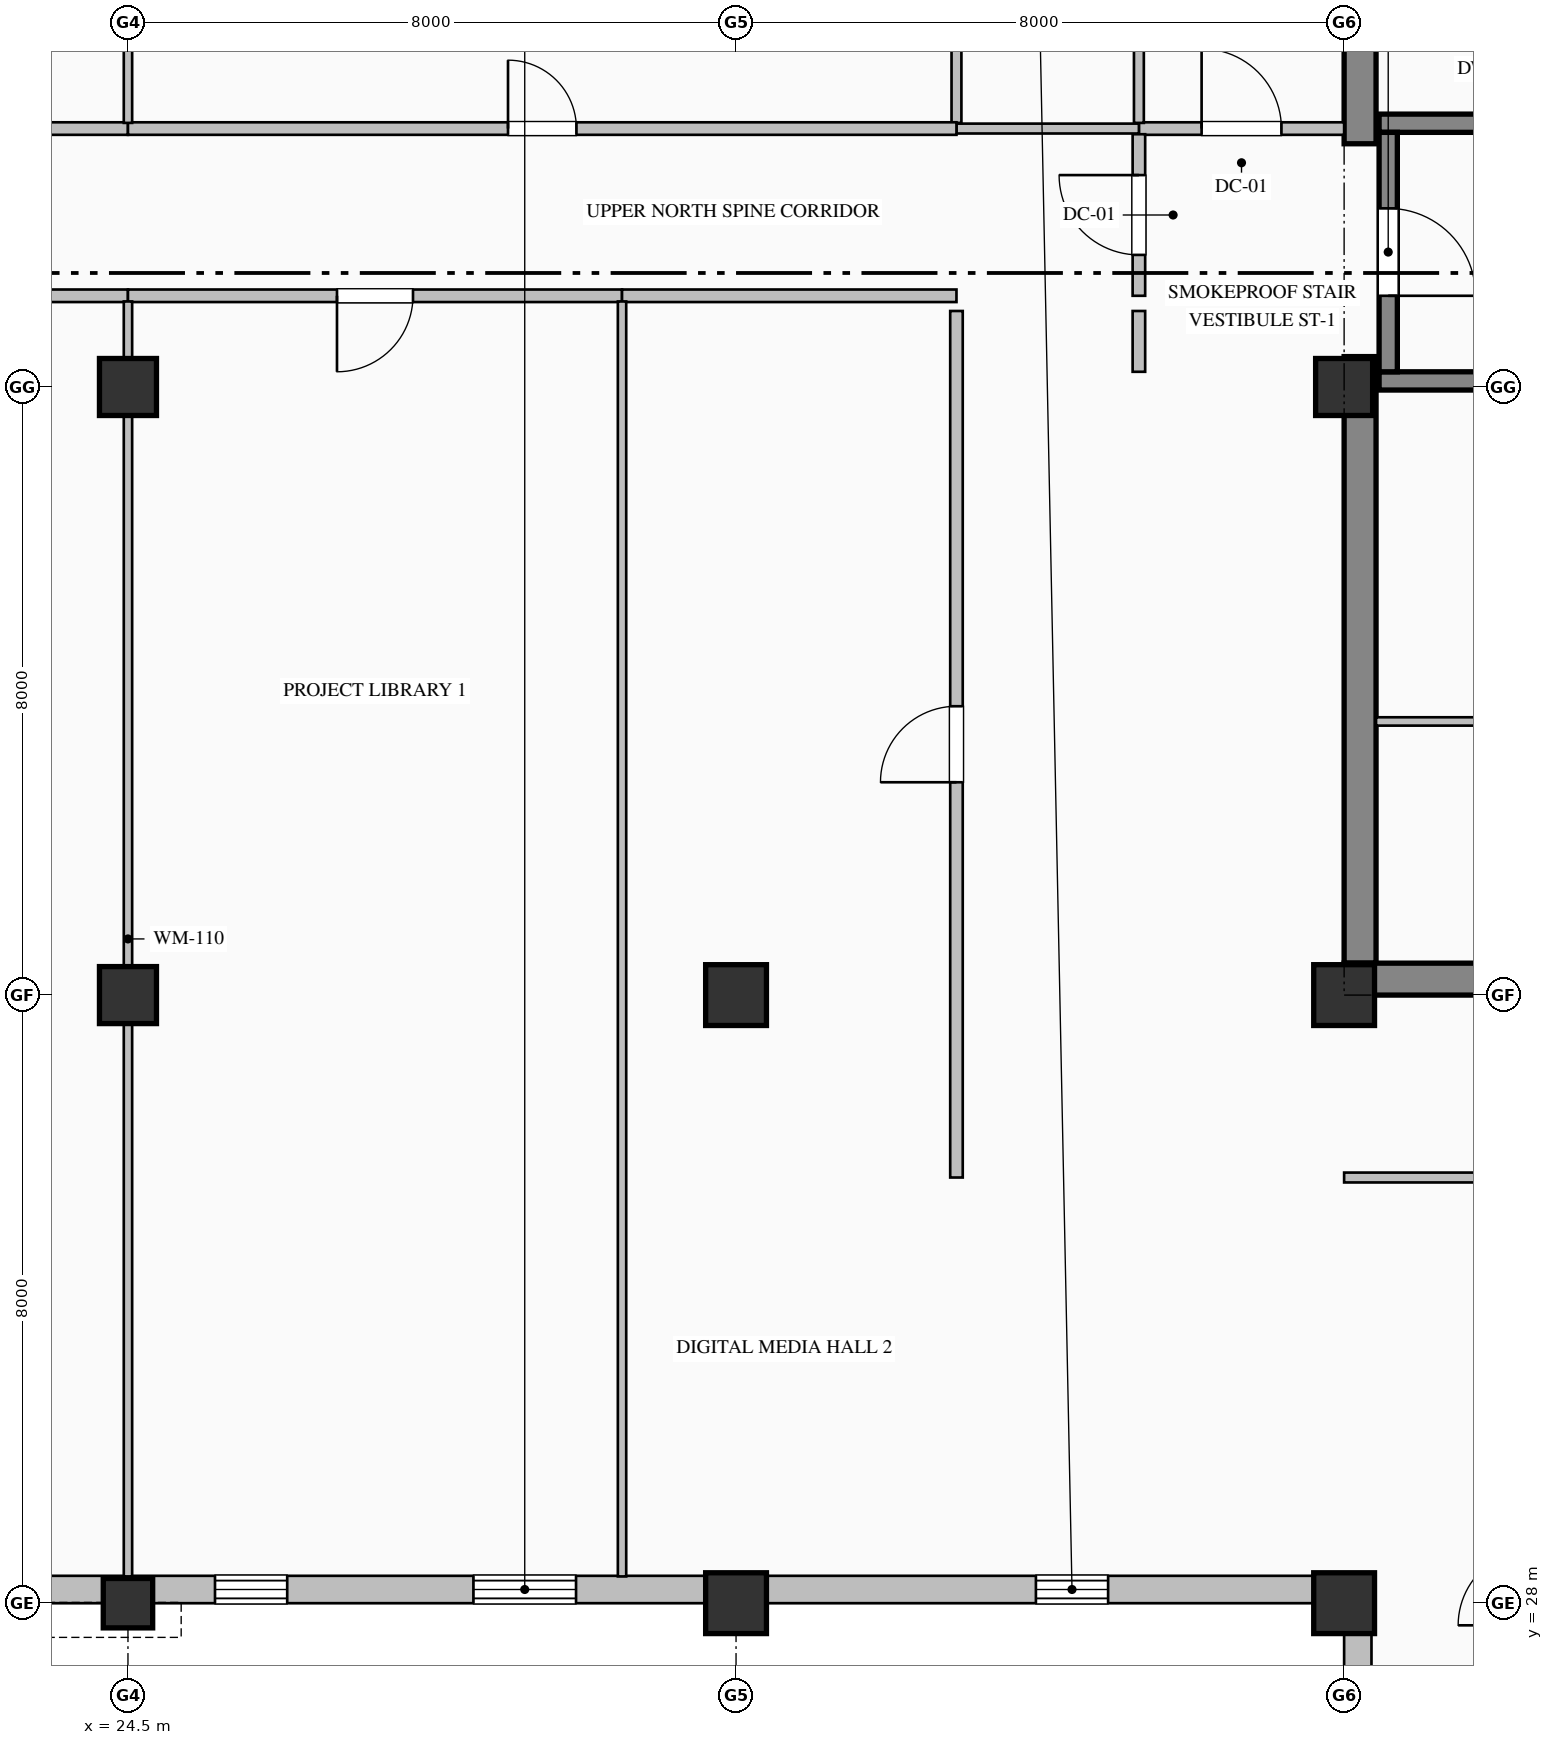
"""IFC4 building model, lengths in metres.
Left out: names, types, materials, properties, quantities, classifications, styles, units other than length and angle.
Written with IfcOpenShell. Run it as: python <this file> out.ifc"""

import sys

from ifc_helpers import new_model, si_unit, direction, frame, frame_2d, origin, origin_2d, place, context, subcontext, project, spatial, rectangle, hollow_rectangle, extrude, element, fill, save


model = new_model("IFC4")
c1 = context("Model", 3, precision=1e-05, world=origin(), true_north=direction((0.0, 1.0)))
c2 = subcontext(c1, "Body", "Model", "MODEL_VIEW")
j1 = project(units=[si_unit("LENGTHUNIT", "METRE"), si_unit("PLANEANGLEUNIT", "RADIAN")], contexts=[c1])
p1 = place(None, origin())
s1 = spatial("IfcSite", under=j1, at=p1, CompositionType="ELEMENT")
p2 = place(p1, origin())
s2 = spatial("IfcBuilding", under=s1, at=p2, CompositionType="ELEMENT")
p3 = place(p2, frame((0.0, 0.0, 319.2)))
s3 = spatial("IfcBuildingStorey", under=s2, at=p3, CompositionType="ELEMENT", Elevation=319.2)
p4 = place(p3, frame((40.71, 36.42, 0.0), z_axis=(0.0, 0.0, 1.0), x_axis=(0.0, 1.0, 0.0)))
e1 = element("IfcWall", 1, at=p4, inside=s3, PredefinedType="SHEAR", context=c2, shape_type="SweptSolid", body=[
    extrude(rectangle(XDim=7.98, YDim=0.42, at=frame_2d((3.99, 0.0))), origin(), (0.0, 0.0, 1.0), 3.785),
])
p5 = place(p3, frame((40.71, 47.2, 0.0), z_axis=(0.0, 0.0, 1.0), x_axis=(0.0, 1.0, 0.0)))
e2 = element("IfcWall", 2, at=p5, inside=s3, PredefinedType="SHEAR", context=c2, shape_type="SweptSolid", body=[
    extrude(rectangle(XDim=4.38, YDim=0.42, at=frame_2d((2.19, 0.0))), origin(), (0.0, 0.0, 1.0), 3.785),
])
p6 = place(p3, frame((40.5, 36.21, 0.0), z_axis=(0.0, 0.0, 1.0), x_axis=(1.0, 0.0, 0.0)))
e3 = element("IfcWall", 3, at=p6, inside=s3, PredefinedType="SHEAR", context=c2, shape_type="SweptSolid", body=[
    extrude(rectangle(XDim=9.1, YDim=0.42, at=frame_2d((4.55, 0.0))), origin(), (0.0, 0.0, 1.0), 3.785),
])
p7 = place(p3, frame((24.5, 28.0, 0.0), z_axis=(0.0, 0.0, 1.0), x_axis=(1.0, 0.0, 0.0)))
e4 = element("IfcColumn", 4, at=p7, inside=s3, PredefinedType="COLUMN", context=c2, shape_type="SweptSolid", body=[
    extrude(hollow_rectangle(XDim=0.65, YDim=0.65, WallThickness=0.028, at=origin_2d()), origin(), (0.0, 0.0, 1.0), 4.0),
])
for number, where, z_axis, x_axis in (
    (5, (24.5, 36.0, 0.0), (0.0, 0.0, 1.0), (1.0, 0.0, 0.0)),
    (6, (24.5, 44.0, 0.0), (0.0, 0.0, 1.0), (1.0, 0.0, 0.0)),
):
    element("IfcColumn", number, at=place(p3, frame(where, z_axis=z_axis, x_axis=x_axis)), inside=s3, PredefinedType="COLUMN", context=c2, shape_type="SweptSolid", body=[
        extrude(rectangle(XDim=0.75, YDim=0.75, at=origin_2d()), origin(), (0.0, 0.0, 1.0), 4.0),
    ])
for number, where, z_axis, x_axis in (
    (7, (32.5, 28.0, 0.0), (0.0, 0.0, 1.0), (1.0, 0.0, 0.0)),
    (8, (32.5, 36.0, 0.0), (0.0, 0.0, 1.0), (1.0, 0.0, 0.0)),
    (9, (40.5, 28.0, 0.0), (0.0, 0.0, 1.0), (1.0, 0.0, 0.0)),
    (10, (40.5, 36.0, 0.0), (0.0, 0.0, 1.0), (1.0, 0.0, 0.0)),
):
    element("IfcColumn", number, at=place(p3, frame(where, z_axis=z_axis, x_axis=x_axis)), inside=s3, PredefinedType="COLUMN", context=c2, shape_type="SweptSolid", body=[
        extrude(hollow_rectangle(XDim=0.8, YDim=0.8, WallThickness=0.032, at=origin_2d()), origin(), (0.0, 0.0, 1.0), 4.0),
    ])
p8 = place(p3, frame((40.5, 44.0, 0.0), z_axis=(0.0, 0.0, 1.0), x_axis=(1.0, 0.0, 0.0)))
e11 = element("IfcColumn", 11, at=p8, inside=s3, PredefinedType="COLUMN", context=c2, shape_type="SweptSolid", body=[
    extrude(rectangle(XDim=0.75, YDim=0.75, at=origin_2d()), origin(), (0.0, 0.0, 1.0), 4.0),
])
p9 = place(p3, frame((40.68, 22.5, 0.0), z_axis=(0.0, 0.0, 1.0), x_axis=(0.0, 1.0, 0.0)))
e12 = element("IfcWall", 12, at=p9, inside=s3, PredefinedType="SOLIDWALL", context=c2, shape_type="SweptSolid", body=[
    extrude(rectangle(XDim=5.86, YDim=0.36, at=frame_2d((2.93, 0.0))), origin(), (0.0, 0.0, 1.0), 3.185),
])
p10 = place(p3, frame((40.52, 28.18, 0.0), z_axis=(0.0, 0.0, 1.0), x_axis=(-1.0, 0.0, 0.0)))
e13 = element("IfcWall", 13, at=p10, inside=s3, PredefinedType="SOLIDWALL", context=c2, shape_type="SweptSolid", body=[
    extrude(rectangle(XDim=20.02, YDim=0.36, at=frame_2d((10.01, 0.0))), origin(), (0.0, 0.0, 1.0), 3.185),
])
p11 = place(p10, frame((3.125, 0.0, 0.9)))
e14 = element("IfcOpeningElement", 14, at=p11, cuts=e13, PredefinedType="OPENING", context=c2, shape_type="SweptSolid", body=[
    extrude(rectangle(XDim=0.95, YDim=1.85, at=frame_2d((0.475, 0.925))), frame((0.0, 0.19, 0.0), z_axis=(0.0, -1.0, 0.0), x_axis=(1.0, 0.0, 0.0)), (0.0, 0.0, 1.0), 0.38),
])
p12 = place(p10, frame((10.125, 0.0, 0.9)))
e15 = element("IfcOpeningElement", 15, at=p12, cuts=e13, PredefinedType="OPENING", context=c2, shape_type="SweptSolid", body=[
    extrude(rectangle(XDim=1.35, YDim=1.85, at=frame_2d((0.675, 0.925))), frame((0.0, 0.19, 0.0), z_axis=(0.0, -1.0, 0.0), x_axis=(1.0, 0.0, 0.0)), (0.0, 0.0, 1.0), 0.38),
])
p13 = place(p10, frame((13.925, 0.0, 0.9)))
e16 = element("IfcOpeningElement", 16, at=p13, cuts=e13, PredefinedType="OPENING", context=c2, shape_type="SweptSolid", body=[
    extrude(rectangle(XDim=0.95, YDim=1.85, at=frame_2d((0.475, 0.925))), frame((0.0, 0.19, 0.0), z_axis=(0.0, -1.0, 0.0), x_axis=(1.0, 0.0, 0.0)), (0.0, 0.0, 1.0), 0.38),
])
for number, where, z_axis, x_axis in (
    (17, (40.96, 47.47, 0.0), (0.0, 0.0, 1.0), (1.0, 0.0, 0.0)),
    (18, (49.04, 44.08, 0.0), (0.0, 0.0, 1.0), (-1.0, 0.0, 0.0)),
):
    element("IfcWall", number, at=place(p3, frame(where, z_axis=z_axis, x_axis=x_axis)), inside=s3, PredefinedType="SOLIDWALL", context=c2, shape_type="SweptSolid", body=[
        extrude(rectangle(XDim=8.08, YDim=0.24, at=frame_2d((4.04, 0.0))), origin(), (0.0, 0.0, 1.0), 4.0),
    ])
p14 = place(p3, frame((41.08, 47.35, 0.0), z_axis=(0.0, 0.0, 1.0), x_axis=(0.0, -1.0, 0.0)))
e19 = element("IfcWall", 19, at=p14, inside=s3, PredefinedType="SOLIDWALL", context=c2, shape_type="SweptSolid", body=[
    extrude(rectangle(XDim=3.15, YDim=0.24, at=frame_2d((1.575, 0.0))), origin(), (0.0, 0.0, 1.0), 4.0),
])
p15 = place(p14, frame((1.0, 0.0, 0.0)))
e20 = element("IfcOpeningElement", 20, at=p15, cuts=e19, PredefinedType="OPENING", context=c2, shape_type="SweptSolid", body=[
    extrude(rectangle(XDim=1.15, YDim=2.2, at=frame_2d((0.575, 1.1))), frame((0.0, 0.13, 0.0), z_axis=(0.0, -1.0, 0.0), x_axis=(1.0, 0.0, 0.0)), (0.0, 0.0, 1.0), 0.26),
])
p16 = place(p3, frame((37.8, 47.4, 0.0), z_axis=(0.0, 0.0, 1.0), x_axis=(1.0, 0.0, 0.0)))
e21 = element("IfcWall", 21, at=p16, inside=s3, PredefinedType="PARTITIONING", context=c2, shape_type="SweptSolid", body=[
    extrude(rectangle(XDim=2.7, YDim=0.165, at=frame_2d((1.35, 0.0))), origin(), (0.0, 0.0, 1.0), 3.785),
])
p17 = place(p16, frame((0.825, 0.0, 0.0)))
e22 = element("IfcOpeningElement", 22, at=p17, cuts=e21, PredefinedType="OPENING", context=c2, shape_type="SweptSolid", body=[
    extrude(rectangle(XDim=1.05, YDim=2.15, at=frame_2d((0.525, 1.075))), frame((0.0, 0.093, 0.0), z_axis=(0.0, -1.0, 0.0), x_axis=(1.0, 0.0, 0.0)), (0.0, 0.0, 1.0), 0.185),
])
p18 = place(p3, frame((37.8, 45.2, 0.0), z_axis=(0.0, 0.0, 1.0), x_axis=(0.0, 1.0, 0.0)))
e23 = element("IfcWall", 23, at=p18, inside=s3, PredefinedType="PARTITIONING", context=c2, shape_type="SweptSolid", body=[
    extrude(rectangle(XDim=2.125, YDim=0.165, at=frame_2d((1.063, 0.0))), origin(), (0.0, 0.0, 1.0), 3.785),
])
p19 = place(p18, frame((0.538, 0.0, 0.0)))
e24 = element("IfcOpeningElement", 24, at=p19, cuts=e23, PredefinedType="OPENING", context=c2, shape_type="SweptSolid", body=[
    extrude(rectangle(XDim=1.05, YDim=2.15, at=frame_2d((0.525, 1.075))), frame((0.0, 0.093, 0.0), z_axis=(0.0, -1.0, 0.0), x_axis=(1.0, 0.0, 0.0)), (0.0, 0.0, 1.0), 0.185),
])
p20 = place(p3, frame((37.8, 44.2, 0.0), z_axis=(0.0, 0.0, 1.0), x_axis=(0.0, 1.0, 0.0)))
e25 = element("IfcWall", 25, at=p20, inside=s3, PredefinedType="PARTITIONING", context=c2, shape_type="SweptSolid", body=[
    extrude(rectangle(XDim=0.8, YDim=0.165, at=frame_2d((0.4, 0.0))), origin(), (0.0, 0.0, 1.0), 3.785),
])
p21 = place(p3, frame((37.8, 47.475, 0.0), z_axis=(0.0, 0.0, 1.0), x_axis=(0.0, 1.0, 0.0)))
e26 = element("IfcWall", 26, at=p21, inside=s3, PredefinedType="PARTITIONING", context=c2, shape_type="SweptSolid", body=[
    extrude(rectangle(XDim=4.173, YDim=0.13, at=frame_2d((2.087, 0.0))), origin(), (0.0, 0.0, 1.0), 3.785),
])
p22 = place(p21, frame((1.577, 0.0, 0.0)))
e27 = element("IfcOpeningElement", 27, at=p22, cuts=e26, PredefinedType="OPENING", context=c2, shape_type="SweptSolid", body=[
    extrude(rectangle(XDim=1.02, YDim=2.15, at=frame_2d((0.51, 1.075))), frame((0.0, 0.075, 0.0), z_axis=(0.0, -1.0, 0.0), x_axis=(1.0, 0.0, 0.0)), (0.0, 0.0, 1.0), 0.15),
])
p23 = place(p3, frame((37.8, 47.4, 0.0), z_axis=(0.0, 0.0, 1.0), x_axis=(-1.0, 0.0, 0.0)))
e28 = element("IfcWall", 28, at=p23, inside=s3, PredefinedType="PARTITIONING", context=c2, shape_type="SweptSolid", body=[
    extrude(rectangle(XDim=2.4, YDim=0.13, at=frame_2d((1.2, 0.0))), origin(), (0.0, 0.0, 1.0), 3.785),
])
p24 = place(p3, frame((35.4, 47.475, 0.0), z_axis=(0.0, 0.0, 1.0), x_axis=(0.0, 1.0, 0.0)))
e29 = element("IfcWall", 29, at=p24, inside=s3, PredefinedType="PARTITIONING", context=c2, shape_type="SweptSolid", body=[
    extrude(rectangle(XDim=4.173, YDim=0.13, at=frame_2d((2.087, 0.0))), origin(), (0.0, 0.0, 1.0), 3.785),
])
p25 = place(p3, frame((40.92, 39.6, 0.0), z_axis=(0.0, 0.0, 1.0), x_axis=(1.0, 0.0, 0.0)))
e30 = element("IfcWall", 30, at=p25, inside=s3, PredefinedType="MOVABLE", context=c2, shape_type="SweptSolid", body=[
    extrude(rectangle(XDim=8.48, YDim=0.11, at=frame_2d((4.24, 0.0))), origin(), (0.0, 0.0, 1.0), 3.785),
])
p26 = place(p3, frame((24.5, 45.2, 0.0), z_axis=(0.0, 0.0, 1.0), x_axis=(-1.0, 0.0, 0.0)))
e31 = element("IfcWall", 31, at=p26, inside=s3, PredefinedType="PARTITIONING", context=c2, shape_type="SweptSolid", body=[
    extrude(rectangle(XDim=4.0, YDim=0.165, at=frame_2d((2.0, 0.0))), origin(), (0.0, 0.0, 1.0), 3.785),
])
p27 = place(p26, frame((1.5, 0.0, 0.0)))
e32 = element("IfcOpeningElement", 32, at=p27, cuts=e31, PredefinedType="OPENING", context=c2, shape_type="SweptSolid", body=[
    extrude(rectangle(XDim=1.0, YDim=2.15, at=frame_2d((0.5, 1.075))), frame((0.0, 0.093, 0.0), z_axis=(0.0, -1.0, 0.0), x_axis=(1.0, 0.0, 0.0)), (0.0, 0.0, 1.0), 0.185),
])
p28 = place(p3, frame((20.5, 47.4, 0.0), z_axis=(0.0, 0.0, 1.0), x_axis=(1.0, 0.0, 0.0)))
e33 = element("IfcWall", 33, at=p28, inside=s3, PredefinedType="PARTITIONING", context=c2, shape_type="SweptSolid", body=[
    extrude(rectangle(XDim=4.0, YDim=0.165, at=frame_2d((2.0, 0.0))), origin(), (0.0, 0.0, 1.0), 3.785),
])
p29 = place(p3, frame((24.5, 47.4, 0.0), z_axis=(0.0, 0.0, 1.0), x_axis=(1.0, 0.0, 0.0)))
e34 = element("IfcWall", 34, at=p29, inside=s3, PredefinedType="PARTITIONING", context=c2, shape_type="SweptSolid", body=[
    extrude(rectangle(XDim=10.9, YDim=0.165, at=frame_2d((5.45, 0.0))), origin(), (0.0, 0.0, 1.0), 3.785),
])
p30 = place(p29, frame((5.0, 0.0, 0.0)))
e35 = element("IfcOpeningElement", 35, at=p30, cuts=e34, PredefinedType="OPENING", context=c2, shape_type="SweptSolid", body=[
    extrude(rectangle(XDim=0.9, YDim=2.15, at=frame_2d((0.45, 1.075))), frame((0.0, 0.093, 0.0), z_axis=(0.0, -1.0, 0.0), x_axis=(1.0, 0.0, 0.0)), (0.0, 0.0, 1.0), 0.185),
])
p31 = place(p3, frame((31.0, 45.2, 0.0), z_axis=(0.0, 0.0, 1.0), x_axis=(-1.0, 0.0, 0.0)))
e36 = element("IfcWall", 36, at=p31, inside=s3, PredefinedType="PARTITIONING", context=c2, shape_type="SweptSolid", body=[
    extrude(rectangle(XDim=6.5, YDim=0.165, at=frame_2d((3.25, 0.0))), origin(), (0.0, 0.0, 1.0), 3.785),
])
p32 = place(p31, frame((2.75, 0.0, 0.0)))
e37 = element("IfcOpeningElement", 37, at=p32, cuts=e36, PredefinedType="OPENING", context=c2, shape_type="SweptSolid", body=[
    extrude(rectangle(XDim=1.0, YDim=2.15, at=frame_2d((0.5, 1.075))), frame((0.0, 0.093, 0.0), z_axis=(0.0, -1.0, 0.0), x_axis=(1.0, 0.0, 0.0)), (0.0, 0.0, 1.0), 0.185),
])
p33 = place(p3, frame((35.4, 45.2, 0.0), z_axis=(0.0, 0.0, 1.0), x_axis=(-1.0, 0.0, 0.0)))
e38 = element("IfcWall", 38, at=p33, inside=s3, PredefinedType="PARTITIONING", context=c2, shape_type="SweptSolid", body=[
    extrude(rectangle(XDim=4.4, YDim=0.165, at=frame_2d((2.2, 0.0))), origin(), (0.0, 0.0, 1.0), 3.785),
])
p34 = place(p3, frame((35.4, 33.6, 0.0), z_axis=(0.0, 0.0, 1.0), x_axis=(0.0, 1.0, 0.0)))
e39 = element("IfcWall", 39, at=p34, inside=s3, PredefinedType="PARTITIONING", context=c2, shape_type="SweptSolid", body=[
    extrude(rectangle(XDim=11.4, YDim=0.165, at=frame_2d((5.7, 0.0))), origin(), (0.0, 0.0, 1.0), 3.785),
])
p35 = place(p34, frame((5.2, 0.0, 0.0)))
e40 = element("IfcOpeningElement", 40, at=p35, cuts=e39, PredefinedType="OPENING", context=c2, shape_type="SweptSolid", body=[
    extrude(rectangle(XDim=1.0, YDim=2.15, at=frame_2d((0.5, 1.075))), frame((0.0, 0.093, 0.0), z_axis=(0.0, -1.0, 0.0), x_axis=(1.0, 0.0, 0.0)), (0.0, 0.0, 1.0), 0.185),
])
p36 = place(p3, frame((43.0, 33.6, 0.0), z_axis=(0.0, 0.0, 1.0), x_axis=(-1.0, 0.0, 0.0)))
e41 = element("IfcWall", 41, at=p36, inside=s3, PredefinedType="PARTITIONING", context=c2, shape_type="SweptSolid", body=[
    extrude(rectangle(XDim=2.5, YDim=0.13, at=frame_2d((1.25, 0.0))), origin(), (0.0, 0.0, 1.0), 3.785),
])
p37 = place(p3, frame((24.5, 51.648, 0.0), z_axis=(0.0, 0.0, 1.0), x_axis=(0.0, -1.0, 0.0)))
e42 = element("IfcWall", 42, at=p37, inside=s3, PredefinedType="MOVABLE", context=c2, shape_type="SweptSolid", body=[
    extrude(rectangle(XDim=4.173, YDim=0.11, at=frame_2d((2.087, 0.0))), origin(), (0.0, 0.0, 1.0), 3.177),
])
p38 = place(p3, frame((24.5, 45.125, 0.0), z_axis=(0.0, 0.0, 1.0), x_axis=(0.0, -1.0, 0.0)))
e43 = element("IfcWall", 43, at=p38, inside=s3, PredefinedType="MOVABLE", context=c2, shape_type="SweptSolid", body=[
    extrude(rectangle(XDim=16.773, YDim=0.11, at=frame_2d((8.387, 0.0))), origin(), (0.0, 0.0, 1.0), 3.177),
])
p39 = place(p3, frame((31.0, 45.125, 0.0), z_axis=(0.0, 0.0, 1.0), x_axis=(0.0, -1.0, 0.0)))
e44 = element("IfcWall", 44, at=p39, inside=s3, PredefinedType="MOVABLE", context=c2, shape_type="SweptSolid", body=[
    extrude(rectangle(XDim=16.773, YDim=0.11, at=frame_2d((8.387, 0.0))), origin(), (0.0, 0.0, 1.0), 3.785),
])
p40 = place(p11, origin())
e45 = element("IfcWindow", 45, at=p40, inside=s3, PartitioningType="SINGLE_PANEL", PredefinedType="WINDOW", context=c2, shape_type="SweptSolid", body=[
    extrude(rectangle(XDim=0.95, YDim=1.85, at=frame_2d((0.475, 0.925))), frame((0.0, 0.15, 0.0), z_axis=(0.0, -1.0, 0.0), x_axis=(1.0, 0.0, 0.0)), (0.0, 0.0, 1.0), 0.06),
])
fill(e14, e45)
p41 = place(p12, origin())
e46 = element("IfcWindow", 46, at=p41, inside=s3, PartitioningType="DOUBLE_PANEL_VERTICAL", PredefinedType="WINDOW", context=c2, shape_type="SweptSolid", body=[
    extrude(rectangle(XDim=1.35, YDim=1.85, at=frame_2d((0.675, 0.925))), frame((0.0, 0.15, 0.0), z_axis=(0.0, -1.0, 0.0), x_axis=(1.0, 0.0, 0.0)), (0.0, 0.0, 1.0), 0.06),
])
fill(e15, e46)
p42 = place(p13, origin())
e47 = element("IfcWindow", 47, at=p42, inside=s3, PartitioningType="SINGLE_PANEL", PredefinedType="WINDOW", context=c2, shape_type="SweptSolid", body=[
    extrude(rectangle(XDim=0.95, YDim=1.85, at=frame_2d((0.475, 0.925))), frame((0.0, 0.15, 0.0), z_axis=(0.0, -1.0, 0.0), x_axis=(1.0, 0.0, 0.0)), (0.0, 0.0, 1.0), 0.06),
])
fill(e16, e47)
p43 = place(p15, origin())
e48 = element("IfcDoor", 48, at=p43, inside=s3, OperationType="SINGLE_SWING_RIGHT", PredefinedType="DOOR", context=c2, shape_type="SweptSolid", body=[
    extrude(rectangle(XDim=1.15, YDim=2.2, at=frame_2d((0.575, 1.1))), frame((0.0, 0.025, 0.0), z_axis=(0.0, -1.0, 0.0), x_axis=(1.0, 0.0, 0.0)), (0.0, 0.0, 1.0), 0.05),
])
fill(e20, e48)
p44 = place(p17, origin())
e49 = element("IfcDoor", 49, at=p44, inside=s3, OperationType="SINGLE_SWING_LEFT", PredefinedType="DOOR", context=c2, shape_type="SweptSolid", body=[
    extrude(rectangle(XDim=1.05, YDim=2.15, at=frame_2d((0.525, 1.075))), frame((0.0, 0.025, 0.0), z_axis=(0.0, -1.0, 0.0), x_axis=(1.0, 0.0, 0.0)), (0.0, 0.0, 1.0), 0.05),
])
fill(e22, e49)
p45 = place(p19, origin())
e50 = element("IfcDoor", 50, at=p45, inside=s3, OperationType="SINGLE_SWING_RIGHT", PredefinedType="DOOR", context=c2, shape_type="SweptSolid", body=[
    extrude(rectangle(XDim=1.05, YDim=2.15, at=frame_2d((0.525, 1.075))), frame((0.0, 0.025, 0.0), z_axis=(0.0, -1.0, 0.0), x_axis=(1.0, 0.0, 0.0)), (0.0, 0.0, 1.0), 0.05),
])
fill(e24, e50)
p46 = place(p30, origin())
e51 = element("IfcDoor", 51, at=p46, inside=s3, OperationType="SINGLE_SWING_LEFT", PredefinedType="DOOR", context=c2, shape_type="SweptSolid", body=[
    extrude(rectangle(XDim=0.9, YDim=2.15, at=frame_2d((0.45, 1.075))), frame((0.0, 0.025, 0.0), z_axis=(0.0, -1.0, 0.0), x_axis=(1.0, 0.0, 0.0)), (0.0, 0.0, 1.0), 0.05),
])
fill(e35, e51)
p47 = place(p32, origin())
e52 = element("IfcDoor", 52, at=p47, inside=s3, OperationType="SINGLE_SWING_RIGHT", PredefinedType="DOOR", context=c2, shape_type="SweptSolid", body=[
    extrude(rectangle(XDim=1.0, YDim=2.15, at=frame_2d((0.5, 1.075))), frame((0.0, 0.025, 0.0), z_axis=(0.0, -1.0, 0.0), x_axis=(1.0, 0.0, 0.0)), (0.0, 0.0, 1.0), 0.05),
])
fill(e37, e52)
p48 = place(p35, origin())
e53 = element("IfcDoor", 53, at=p48, inside=s3, OperationType="SINGLE_SWING_LEFT", PredefinedType="DOOR", context=c2, shape_type="SweptSolid", body=[
    extrude(rectangle(XDim=1.0, YDim=2.15, at=frame_2d((0.5, 1.075))), frame((0.0, 0.025, 0.0), z_axis=(0.0, -1.0, 0.0), x_axis=(1.0, 0.0, 0.0)), (0.0, 0.0, 1.0), 0.05),
])
fill(e40, e53)
save(model, sys.argv[1])
